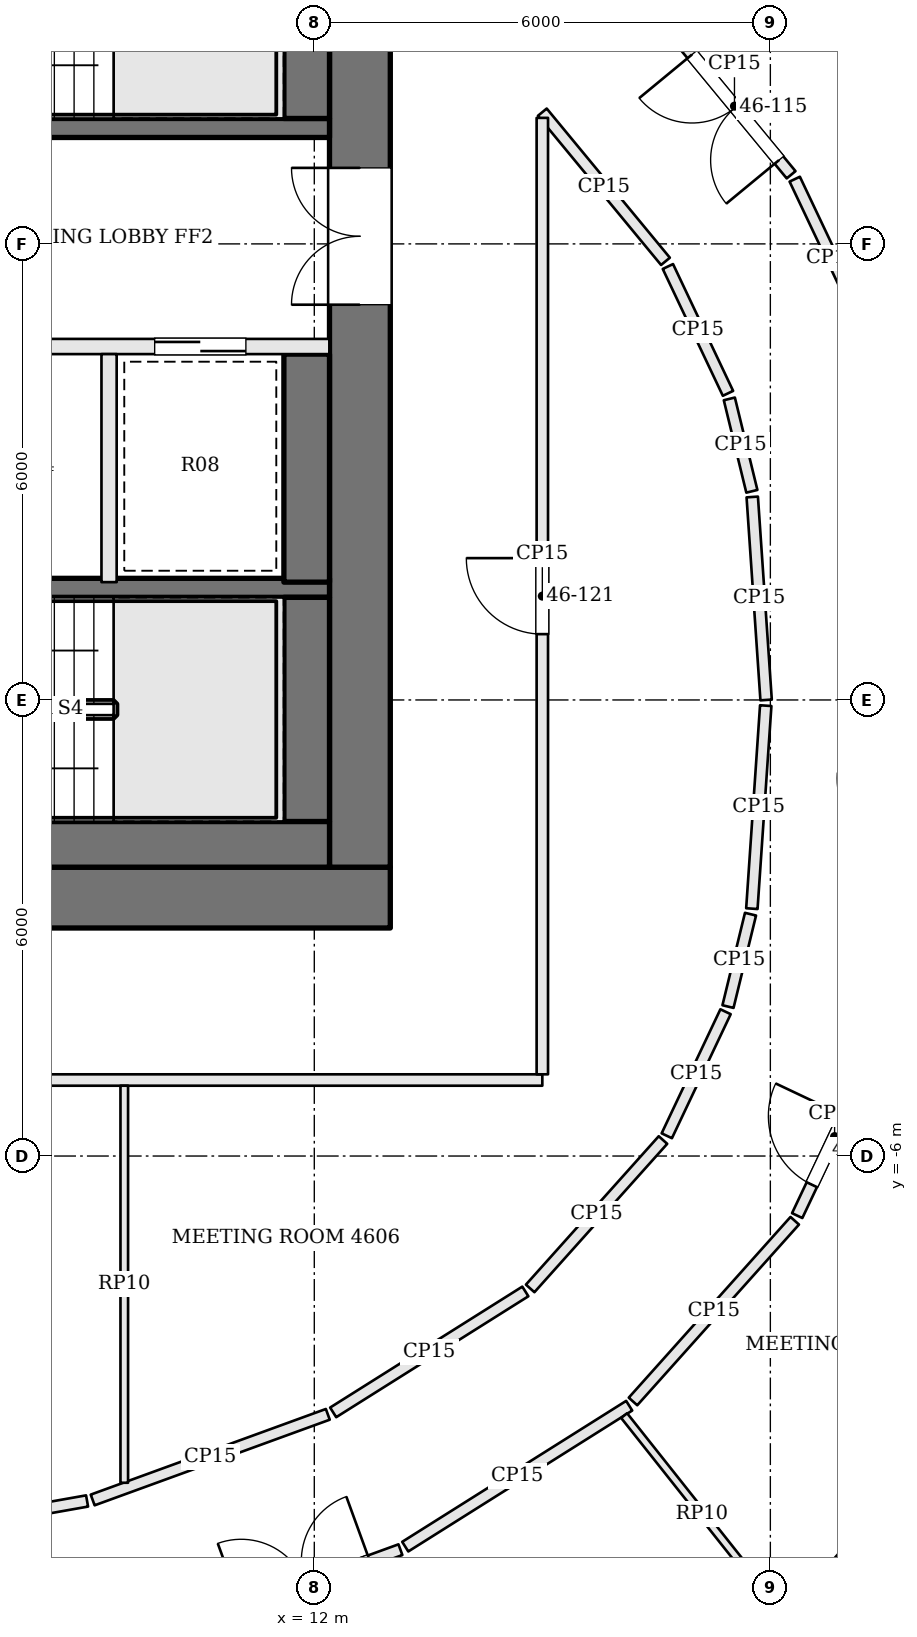
"""IFC4 building model, lengths in metres.
Left out: names, types, materials, properties, quantities, classifications, styles, units other than length and angle.
Written with IfcOpenShell. Run it as: python <this file> out.ifc"""

import sys

from ifc_helpers import new_model, si_unit, direction, frame, frame_2d, origin, place, context, subcontext, project, spatial, rectangle, extrude, element, fill, save


model = new_model("IFC4")
c1 = context("Model", 3, precision=1e-05, world=origin(), true_north=direction((0.0, 1.0)))
c2 = subcontext(c1, "Body", "Model", "MODEL_VIEW")
j1 = project(units=[si_unit("LENGTHUNIT", "METRE"), si_unit("PLANEANGLEUNIT", "RADIAN")], contexts=[c1])
p1 = place(None, origin())
s1 = spatial("IfcSite", under=j1, at=p1, CompositionType="ELEMENT")
p2 = place(p1, origin())
s2 = spatial("IfcBuilding", under=s1, at=p2, CompositionType="ELEMENT")
p3 = place(p2, frame((0.0, 0.0, 189.6)))
s3 = spatial("IfcBuildingStorey", under=s2, at=p3, CompositionType="ELEMENT", Elevation=189.6)
p4 = place(p3, frame((-13.0, -2.6, 0.0), z_axis=(0.0, 0.0, 1.0), x_axis=(1.0, 0.0, 0.0)))
e1 = element("IfcWall", 1, at=p4, inside=s3, PredefinedType="SHEAR", context=c2, shape_type="SweptSolid", body=[
    extrude(rectangle(XDim=26.0, YDim=0.8, at=frame_2d((13.0, 0.0))), origin(), (0.0, 0.0, 1.0), 3.9),
])
p5 = place(p4, frame((9.475, 0.0, 0.0)))
e2 = element("IfcOpeningElement", 2, at=p5, cuts=e1, PredefinedType="OPENING", context=c2, shape_type="SweptSolid", body=[
    extrude(rectangle(XDim=0.9, YDim=2.1, at=frame_2d((0.45, 1.05))), frame((0.0, 0.41, 0.0), z_axis=(0.0, -1.0, 0.0), x_axis=(1.0, 0.0, 0.0)), (0.0, 0.0, 1.0), 0.82),
])
p6 = place(p4, frame((12.75, 0.0, 0.0)))
e3 = element("IfcOpeningElement", 3, at=p6, cuts=e1, PredefinedType="OPENING", context=c2, shape_type="SweptSolid", body=[
    extrude(rectangle(XDim=0.9, YDim=2.1, at=frame_2d((0.45, 1.05))), frame((0.0, 0.41, 0.0), z_axis=(0.0, -1.0, 0.0), x_axis=(1.0, 0.0, 0.0)), (0.0, 0.0, 1.0), 0.82),
])
p7 = place(p4, frame((15.05, 0.0, 0.0)))
e4 = element("IfcOpeningElement", 4, at=p7, cuts=e1, PredefinedType="OPENING", context=c2, shape_type="SweptSolid", body=[
    extrude(rectangle(XDim=1.0, YDim=2.1, at=frame_2d((0.5, 1.05))), frame((0.0, 0.41, 0.0), z_axis=(0.0, -1.0, 0.0), x_axis=(1.0, 0.0, 0.0)), (0.0, 0.0, 1.0), 0.82),
])
p8 = place(p4, frame((16.825, 0.0, 0.0)))
e5 = element("IfcOpeningElement", 5, at=p8, cuts=e1, PredefinedType="OPENING", context=c2, shape_type="SweptSolid", body=[
    extrude(rectangle(XDim=0.7, YDim=2.1, at=frame_2d((0.35, 1.05))), frame((0.0, 0.41, 0.0), z_axis=(0.0, -1.0, 0.0), x_axis=(1.0, 0.0, 0.0)), (0.0, 0.0, 1.0), 0.82),
])
p9 = place(p3, frame((12.6, -2.2, 0.0), z_axis=(0.0, 0.0, 1.0), x_axis=(0.0, 1.0, 0.0)))
e6 = element("IfcWall", 6, at=p9, inside=s3, PredefinedType="SHEAR", context=c2, shape_type="SweptSolid", body=[
    extrude(rectangle(XDim=13.4, YDim=0.8, at=frame_2d((6.7, 0.0))), origin(), (0.0, 0.0, 1.0), 3.9),
])
p10 = place(p9, frame((7.4, 0.0, 0.0)))
e7 = element("IfcOpeningElement", 7, at=p10, cuts=e6, PredefinedType="OPENING", context=c2, shape_type="SweptSolid", body=[
    extrude(rectangle(XDim=1.8, YDim=2.1, at=frame_2d((0.9, 1.05))), frame((0.0, 0.41, 0.0), z_axis=(0.0, -1.0, 0.0), x_axis=(1.0, 0.0, 0.0)), (0.0, 0.0, 1.0), 0.82),
])
p11 = place(p3, frame((12.2, 7.525, 0.0), z_axis=(0.0, 0.0, 1.0), x_axis=(-1.0, 0.0, 0.0)))
e8 = element("IfcWall", 8, at=p11, inside=s3, PredefinedType="SOLIDWALL", context=c2, shape_type="SweptSolid", body=[
    extrude(rectangle(XDim=7.1, YDim=0.25, at=frame_2d((3.55, 0.0))), origin(), (0.0, 0.0, 1.0), 3.7),
])
p12 = place(p11, frame((5.8, 0.0, 0.0)))
e9 = element("IfcOpeningElement", 9, at=p12, cuts=e8, PredefinedType="OPENING", context=c2, shape_type="SweptSolid", body=[
    extrude(rectangle(XDim=1.2, YDim=2.1, at=frame_2d((0.6, 1.05))), frame((0.0, 0.135, 0.0), z_axis=(0.0, -1.0, 0.0), x_axis=(1.0, 0.0, 0.0)), (0.0, 0.0, 1.0), 0.27),
])
p13 = place(p3, frame((12.2, 4.65, 0.0), z_axis=(0.0, 0.0, 1.0), x_axis=(-1.0, 0.0, 0.0)))
e10 = element("IfcWall", 10, at=p13, inside=s3, PredefinedType="SOLIDWALL", context=c2, shape_type="SweptSolid", body=[
    extrude(rectangle(XDim=7.1, YDim=0.2, at=frame_2d((3.55, 0.0))), origin(), (0.0, 0.0, 1.0), 3.7),
])
p14 = place(p13, frame((4.4, 0.0, 0.0)))
e11 = element("IfcOpeningElement", 11, at=p14, cuts=e10, PredefinedType="OPENING", context=c2, shape_type="SweptSolid", body=[
    extrude(rectangle(XDim=1.2, YDim=2.1, at=frame_2d((0.6, 1.05))), frame((0.0, 0.11, 0.0), z_axis=(0.0, -1.0, 0.0), x_axis=(1.0, 0.0, 0.0)), (0.0, 0.0, 1.0), 0.22),
])
p15 = place(p13, frame((1.1, 0.0, 0.0)))
e12 = element("IfcOpeningElement", 12, at=p15, cuts=e10, PredefinedType="OPENING", context=c2, shape_type="SweptSolid", body=[
    extrude(rectangle(XDim=1.2, YDim=2.1, at=frame_2d((0.6, 1.05))), frame((0.0, 0.11, 0.0), z_axis=(0.0, -1.0, 0.0), x_axis=(1.0, 0.0, 0.0)), (0.0, 0.0, 1.0), 0.22),
])
p16 = place(p3, frame((12.2, 1.475, 0.0), z_axis=(0.0, 0.0, 1.0), x_axis=(-1.0, 0.0, 0.0)))
e13 = element("IfcWall", 13, at=p16, inside=s3, PredefinedType="SOLIDWALL", context=c2, shape_type="SweptSolid", body=[
    extrude(rectangle(XDim=7.1, YDim=0.25, at=frame_2d((3.55, 0.0))), origin(), (0.0, 0.0, 1.0), 3.7),
])
p17 = place(p16, frame((5.8, 0.0, 0.0)))
e14 = element("IfcOpeningElement", 14, at=p17, cuts=e13, PredefinedType="OPENING", context=c2, shape_type="SweptSolid", body=[
    extrude(rectangle(XDim=1.2, YDim=2.1, at=frame_2d((0.6, 1.05))), frame((0.0, 0.135, 0.0), z_axis=(0.0, -1.0, 0.0), x_axis=(1.0, 0.0, 0.0)), (0.0, 0.0, 1.0), 0.27),
])
p18 = place(p3, frame((9.3, 4.55, 0.0), z_axis=(0.0, 0.0, 1.0), x_axis=(0.0, -1.0, 0.0)))
e15 = element("IfcWall", 15, at=p18, inside=s3, PredefinedType="SOLIDWALL", context=c2, shape_type="SweptSolid", body=[
    extrude(rectangle(XDim=3.0, YDim=0.2, at=frame_2d((1.5, 0.0))), origin(), (0.0, 0.0, 1.0), 3.7),
])
p19 = place(p3, frame((11.9, 10.6, 0.0), z_axis=(0.0, 0.0, 1.0), x_axis=(0.0, -1.0, 0.0)))
e16 = element("IfcWall", 16, at=p19, inside=s3, PredefinedType="SOLIDWALL", context=c2, shape_type="SweptSolid", body=[
    extrude(rectangle(XDim=2.95, YDim=0.6, at=frame_2d((1.475, 0.0))), origin(), (0.0, 0.0, 1.0), 3.7),
])
p20 = place(p3, frame((11.9, 4.55, 0.0), z_axis=(0.0, 0.0, 1.0), x_axis=(0.0, -1.0, 0.0)))
e17 = element("IfcWall", 17, at=p20, inside=s3, PredefinedType="SOLIDWALL", context=c2, shape_type="SweptSolid", body=[
    extrude(rectangle(XDim=3.0, YDim=0.6, at=frame_2d((1.5, 0.0))), origin(), (0.0, 0.0, 1.0), 3.7),
])
p21 = place(p3, frame((11.9, 1.35, 0.0), z_axis=(0.0, 0.0, 1.0), x_axis=(0.0, -1.0, 0.0)))
e18 = element("IfcWall", 18, at=p21, inside=s3, PredefinedType="SOLIDWALL", context=c2, shape_type="SweptSolid", body=[
    extrude(rectangle(XDim=2.95, YDim=0.6, at=frame_2d((1.475, 0.0))), origin(), (0.0, 0.0, 1.0), 3.7),
])
p22 = place(p3, frame((12.2, -1.9, 0.0), z_axis=(0.0, 0.0, 1.0), x_axis=(-1.0, 0.0, 0.0)))
e19 = element("IfcWall", 19, at=p22, inside=s3, PredefinedType="SOLIDWALL", context=c2, shape_type="SweptSolid", body=[
    extrude(rectangle(XDim=7.1, YDim=0.6, at=frame_2d((3.55, 0.0))), origin(), (0.0, 0.0, 1.0), 3.7),
])
p23 = place(p3, frame((9.676, -12.438, 0.0), z_axis=(0.0, 0.0, 1.0), x_axis=(0.939640289748, 0.342163887461, 0.0)))
e20 = element("IfcWall", 20, at=p23, inside=s3, PredefinedType="PARTITIONING", context=c2, shape_type="SweptSolid", body=[
    extrude(rectangle(XDim=3.68, YDim=0.15, at=frame_2d((1.84, 0.0))), origin(), (0.0, 0.0, 1.0), 3.084),
])
p24 = place(p23, frame((1.45, 0.0, 0.0)))
e21 = element("IfcOpeningElement", 21, at=p24, cuts=e20, PredefinedType="OPENING", context=c2, shape_type="SweptSolid", body=[
    extrude(rectangle(XDim=1.8, YDim=2.1, at=frame_2d((0.9, 1.05))), frame((0.0, 0.085, 0.0), z_axis=(0.0, -1.0, 0.0), x_axis=(1.0, 0.0, 0.0)), (0.0, 0.0, 1.0), 0.17),
])
p25 = place(p3, frame((13.197, -11.139, 0.0), z_axis=(0.0, 0.0, 1.0), x_axis=(0.846390903833, 0.532562144644, 0.0)))
e22 = element("IfcWall", 22, at=p25, inside=s3, PredefinedType="PARTITIONING", context=c2, shape_type="SweptSolid", body=[
    extrude(rectangle(XDim=3.481, YDim=0.15, at=frame_2d((1.741, 0.0))), origin(), (0.0, 0.0, 1.0), 3.084),
])
p26 = place(p3, frame((16.193, -9.229, 0.0), z_axis=(0.0, 0.0, 1.0), x_axis=(0.666882089048, 0.745163256815, 0.0)))
e23 = element("IfcWall", 23, at=p26, inside=s3, PredefinedType="PARTITIONING", context=c2, shape_type="SweptSolid", body=[
    extrude(rectangle(XDim=3.19, YDim=0.15, at=frame_2d((1.595, 0.0))), origin(), (0.0, 0.0, 1.0), 3.084),
])
p27 = place(p3, frame((18.353, -6.784, 0.0), z_axis=(0.0, 0.0, 1.0), x_axis=(0.428086344739, 0.903737838894, 0.0)))
e24 = element("IfcWall", 24, at=p27, inside=s3, PredefinedType="PARTITIONING", context=c2, shape_type="SweptSolid", body=[
    extrude(rectangle(XDim=2.3, YDim=0.15, at=frame_2d((1.15, 0.0))), origin(), (0.0, 0.0, 1.0), 3.084),
])
p28 = place(p27, frame((0.45, 0.0, 0.0)))
e25 = element("IfcOpeningElement", 25, at=p28, cuts=e24, PredefinedType="OPENING", context=c2, shape_type="SweptSolid", body=[
    extrude(rectangle(XDim=1.0, YDim=2.4, at=frame_2d((0.5, 1.2))), frame((0.0, 0.085, 0.0), z_axis=(0.0, -1.0, 0.0), x_axis=(1.0, 0.0, 0.0)), (0.0, 0.0, 1.0), 0.17),
])
p29 = place(p3, frame((19.305, 4.773, 0.0), z_axis=(0.0, 0.0, 1.0), x_axis=(-0.428173054138, 0.903696760927, 0.0)))
e26 = element("IfcWall", 26, at=p29, inside=s3, PredefinedType="PARTITIONING", context=c2, shape_type="SweptSolid", body=[
    extrude(rectangle(XDim=2.3, YDim=0.15, at=frame_2d((1.15, 0.0))), origin(), (0.0, 0.0, 1.0), 3.084),
])
p30 = place(p3, frame((18.273, 6.909, 0.0), z_axis=(0.0, 0.0, 1.0), x_axis=(-0.63653648943, 0.771246586783, 0.0)))
e27 = element("IfcWall", 27, at=p30, inside=s3, PredefinedType="PARTITIONING", context=c2, shape_type="SweptSolid", body=[
    extrude(rectangle(XDim=2.342, YDim=0.15, at=frame_2d((1.171, 0.0))), origin(), (0.0, 0.0, 1.0), 3.084),
])
p31 = place(p30, frame((0.25, 0.0, 0.0)))
e28 = element("IfcOpeningElement", 28, at=p31, cuts=e27, PredefinedType="OPENING", context=c2, shape_type="SweptSolid", body=[
    extrude(rectangle(XDim=1.8, YDim=2.1, at=frame_2d((0.9, 1.05))), frame((0.0, 0.085, 0.0), z_axis=(0.0, -1.0, 0.0), x_axis=(1.0, 0.0, 0.0)), (0.0, 0.0, 1.0), 0.17),
])
p32 = place(p3, frame((15.0, 7.733, 0.0), z_axis=(0.0, 0.0, 1.0), x_axis=(0.636601263488, -0.771193121938, 0.0)))
e29 = element("IfcWall", 29, at=p32, inside=s3, PredefinedType="PARTITIONING", context=c2, shape_type="SweptSolid", body=[
    extrude(rectangle(XDim=2.545, YDim=0.15, at=frame_2d((1.272, 0.0))), origin(), (0.0, 0.0, 1.0), 3.084),
])
p33 = place(p3, frame((16.652, 5.702, 0.0), z_axis=(0.0, 0.0, 1.0), x_axis=(0.428126129773, -0.903718992279, 0.0)))
e30 = element("IfcWall", 30, at=p33, inside=s3, PredefinedType="PARTITIONING", context=c2, shape_type="SweptSolid", body=[
    extrude(rectangle(XDim=1.846, YDim=0.15, at=frame_2d((0.923, 0.0))), origin(), (0.0, 0.0, 1.0), 3.084),
])
p34 = place(p3, frame((17.46, 3.961, 0.0), z_axis=(0.0, 0.0, 1.0), x_axis=(0.236655249498, -0.971593687137, 0.0)))
e31 = element("IfcWall", 31, at=p34, inside=s3, PredefinedType="PARTITIONING", context=c2, shape_type="SweptSolid", body=[
    extrude(rectangle(XDim=1.251, YDim=0.15, at=frame_2d((0.626, 0.0))), origin(), (0.0, 0.0, 1.0), 3.084),
])
p35 = place(p3, frame((17.762, 2.67, 0.0), z_axis=(0.0, 0.0, 1.0), x_axis=(0.068135311644, -0.997676089373, 0.0)))
e32 = element("IfcWall", 32, at=p35, inside=s3, PredefinedType="PARTITIONING", context=c2, shape_type="SweptSolid", body=[
    extrude(rectangle(XDim=2.677, YDim=0.15, at=frame_2d((1.338, 0.0))), origin(), (0.0, 0.0, 1.0), 3.084),
])
p36 = place(p3, frame((17.939, -0.075, 0.0), z_axis=(0.0, 0.0, 1.0), x_axis=(-0.068226099283, -0.99766988497, 0.0)))
e33 = element("IfcWall", 33, at=p36, inside=s3, PredefinedType="PARTITIONING", context=c2, shape_type="SweptSolid", body=[
    extrude(rectangle(XDim=2.677, YDim=0.15, at=frame_2d((1.338, 0.0))), origin(), (0.0, 0.0, 1.0), 3.084),
])
p37 = place(p3, frame((17.739, -2.818, 0.0), z_axis=(0.0, 0.0, 1.0), x_axis=(-0.236884307907, -0.971537865792, 0.0)))
e34 = element("IfcWall", 34, at=p37, inside=s3, PredefinedType="PARTITIONING", context=c2, shape_type="SweptSolid", body=[
    extrude(rectangle(XDim=1.251, YDim=0.15, at=frame_2d((0.625, 0.0))), origin(), (0.0, 0.0, 1.0), 3.084),
])
p38 = place(p3, frame((17.41, -4.102, 0.0), z_axis=(0.0, 0.0, 1.0), x_axis=(-0.428074720318, -0.903743345107, 0.0)))
e35 = element("IfcWall", 35, at=p38, inside=s3, PredefinedType="PARTITIONING", context=c2, shape_type="SweptSolid", body=[
    extrude(rectangle(XDim=1.806, YDim=0.15, at=frame_2d((0.903, 0.0))), origin(), (0.0, 0.0, 1.0), 3.084),
])
p39 = place(p3, frame((16.587, -5.789, 0.0), z_axis=(0.0, 0.0, 1.0), x_axis=(-0.666887460656, -0.745158449472, 0.0)))
e36 = element("IfcWall", 36, at=p39, inside=s3, PredefinedType="PARTITIONING", context=c2, shape_type="SweptSolid", body=[
    extrude(rectangle(XDim=2.62, YDim=0.15, at=frame_2d((1.31, 0.0))), origin(), (0.0, 0.0, 1.0), 3.084),
])
p40 = place(p3, frame((14.777, -7.781, 0.0), z_axis=(0.0, 0.0, 1.0), x_axis=(-0.846359741043, -0.532611667862, 0.0)))
e37 = element("IfcWall", 37, at=p40, inside=s3, PredefinedType="PARTITIONING", context=c2, shape_type="SweptSolid", body=[
    extrude(rectangle(XDim=2.987, YDim=0.15, at=frame_2d((1.494, 0.0))), origin(), (0.0, 0.0, 1.0), 3.084),
])
p41 = place(p3, frame((12.178, -9.398, 0.0), z_axis=(0.0, 0.0, 1.0), x_axis=(-0.939609240084, -0.342249143093, 0.0)))
e38 = element("IfcWall", 38, at=p41, inside=s3, PredefinedType="PARTITIONING", context=c2, shape_type="SweptSolid", body=[
    extrude(rectangle(XDim=3.292, YDim=0.15, at=frame_2d((1.646, 0.0))), origin(), (0.0, 0.0, 1.0), 3.084),
])
p42 = place(p3, frame((9.01, -10.538, 0.0), z_axis=(0.0, 0.0, 1.0), x_axis=(-0.984645638575, -0.174565077936, 0.0)))
e39 = element("IfcWall", 39, at=p42, inside=s3, PredefinedType="PARTITIONING", context=c2, shape_type="SweptSolid", body=[
    extrude(rectangle(XDim=4.358, YDim=0.15, at=frame_2d((2.179, 0.0))), origin(), (0.0, 0.0, 1.0), 3.084),
])
p43 = place(p3, frame((-14.925, -5.0, 0.0), z_axis=(0.0, 0.0, 1.0), x_axis=(1.0, 0.0, 0.0)))
e40 = element("IfcWall", 40, at=p43, inside=s3, PredefinedType="PARTITIONING", context=c2, shape_type="SweptSolid", body=[
    extrude(rectangle(XDim=29.925, YDim=0.15, at=frame_2d((14.962, 0.0))), origin(), (0.0, 0.0, 1.0), 3.084),
])
p44 = place(p43, frame((14.025, 0.0, 0.0)))
e41 = element("IfcOpeningElement", 41, at=p44, cuts=e40, PredefinedType="OPENING", context=c2, shape_type="SweptSolid", body=[
    extrude(rectangle(XDim=1.8, YDim=2.1, at=frame_2d((0.9, 1.05))), frame((0.0, 0.085, 0.0), z_axis=(0.0, -1.0, 0.0), x_axis=(1.0, 0.0, 0.0)), (0.0, 0.0, 1.0), 0.17),
])
p45 = place(p3, frame((15.0, -4.925, 0.0), z_axis=(0.0, 0.0, 1.0), x_axis=(0.0, 1.0, 0.0)))
e42 = element("IfcWall", 42, at=p45, inside=s3, PredefinedType="PARTITIONING", context=c2, shape_type="SweptSolid", body=[
    extrude(rectangle(XDim=12.583, YDim=0.15, at=frame_2d((6.292, 0.0))), origin(), (0.0, 0.0, 1.0), 3.084),
])
p46 = place(p45, frame((5.791, 0.0, 0.0)))
e43 = element("IfcOpeningElement", 43, at=p46, cuts=e42, PredefinedType="OPENING", context=c2, shape_type="SweptSolid", body=[
    extrude(rectangle(XDim=1.0, YDim=2.4, at=frame_2d((0.5, 1.2))), frame((0.0, 0.085, 0.0), z_axis=(0.0, -1.0, 0.0), x_axis=(1.0, 0.0, 0.0)), (0.0, 0.0, 1.0), 0.17),
])
p47 = place(p3, frame((21.149, -8.789, 0.0), z_axis=(0.0, 0.0, 1.0), x_axis=(-0.666915902537, -0.745132994132, 0.0)))
e44 = element("IfcWall", 44, at=p47, inside=s3, PredefinedType="PARTITIONING", context=c2, shape_type="SweptSolid", body=[
    extrude(rectangle(XDim=4.186, YDim=0.1, at=frame_2d((2.093, 0.0))), origin(), (0.0, 0.0, 1.0), 3.084),
])
p48 = place(p3, frame((16.076, -9.415, 0.0), z_axis=(0.0, 0.0, 1.0), x_axis=(0.621346089483, -0.783536238526, 0.0)))
e45 = element("IfcWall", 45, at=p48, inside=s3, PredefinedType="PARTITIONING", context=c2, shape_type="SweptSolid", body=[
    extrude(rectangle(XDim=3.295, YDim=0.1, at=frame_2d((1.647, 0.0))), origin(), (0.0, 0.0, 1.0), 3.084),
])
p49 = place(p3, frame((9.5, -10.299, 0.0), z_axis=(0.0, 0.0, 1.0), x_axis=(0.0, 1.0, 0.0)))
e46 = element("IfcWall", 46, at=p49, inside=s3, PredefinedType="PARTITIONING", context=c2, shape_type="SweptSolid", body=[
    extrude(rectangle(XDim=5.224, YDim=0.1, at=frame_2d((2.612, 0.0))), origin(), (0.0, 0.0, 1.0), 3.084),
])
p50 = place(p10, origin())
e47 = element("IfcDoor", 47, at=p50, inside=s3, OperationType="DOUBLE_DOOR_SINGLE_SWING", PredefinedType="DOOR", context=c2, shape_type="SweptSolid", body=[
    extrude(rectangle(XDim=1.8, YDim=2.1, at=frame_2d((0.9, 1.05))), frame((0.0, 0.025, 0.0), z_axis=(0.0, -1.0, 0.0), x_axis=(1.0, 0.0, 0.0)), (0.0, 0.0, 1.0), 0.05),
])
fill(e7, e47)
p51 = place(p15, origin())
e48 = element("IfcDoor", 48, at=p51, inside=s3, OperationType="SLIDING_TO_RIGHT", PredefinedType="DOOR", context=c2, shape_type="SweptSolid", body=[
    extrude(rectangle(XDim=1.2, YDim=2.1, at=frame_2d((0.6, 1.05))), frame((0.0, 0.025, 0.0), z_axis=(0.0, -1.0, 0.0), x_axis=(1.0, 0.0, 0.0)), (0.0, 0.0, 1.0), 0.05),
])
fill(e12, e48)
p52 = place(p28, origin())
e49 = element("IfcDoor", 49, at=p52, inside=s3, OperationType="SINGLE_SWING_RIGHT", PredefinedType="DOOR", context=c2, shape_type="SweptSolid", body=[
    extrude(rectangle(XDim=1.0, YDim=2.4, at=frame_2d((0.5, 1.2))), frame((0.0, 0.025, 0.0), z_axis=(0.0, -1.0, 0.0), x_axis=(1.0, 0.0, 0.0)), (0.0, 0.0, 1.0), 0.05),
])
fill(e25, e49)
p53 = place(p31, origin())
e50 = element("IfcDoor", 50, at=p53, inside=s3, OperationType="DOUBLE_DOOR_SINGLE_SWING", PredefinedType="DOOR", context=c2, shape_type="SweptSolid", body=[
    extrude(rectangle(XDim=1.8, YDim=2.1, at=frame_2d((0.9, 1.05))), frame((0.0, 0.025, 0.0), z_axis=(0.0, -1.0, 0.0), x_axis=(1.0, 0.0, 0.0)), (0.0, 0.0, 1.0), 0.05),
])
fill(e28, e50)
p54 = place(p46, origin())
e51 = element("IfcDoor", 51, at=p54, inside=s3, OperationType="SINGLE_SWING_RIGHT", PredefinedType="DOOR", context=c2, shape_type="SweptSolid", body=[
    extrude(rectangle(XDim=1.0, YDim=2.4, at=frame_2d((0.5, 1.2))), frame((0.0, 0.025, 0.0), z_axis=(0.0, -1.0, 0.0), x_axis=(1.0, 0.0, 0.0)), (0.0, 0.0, 1.0), 0.05),
])
fill(e43, e51)
save(model, sys.argv[1])
